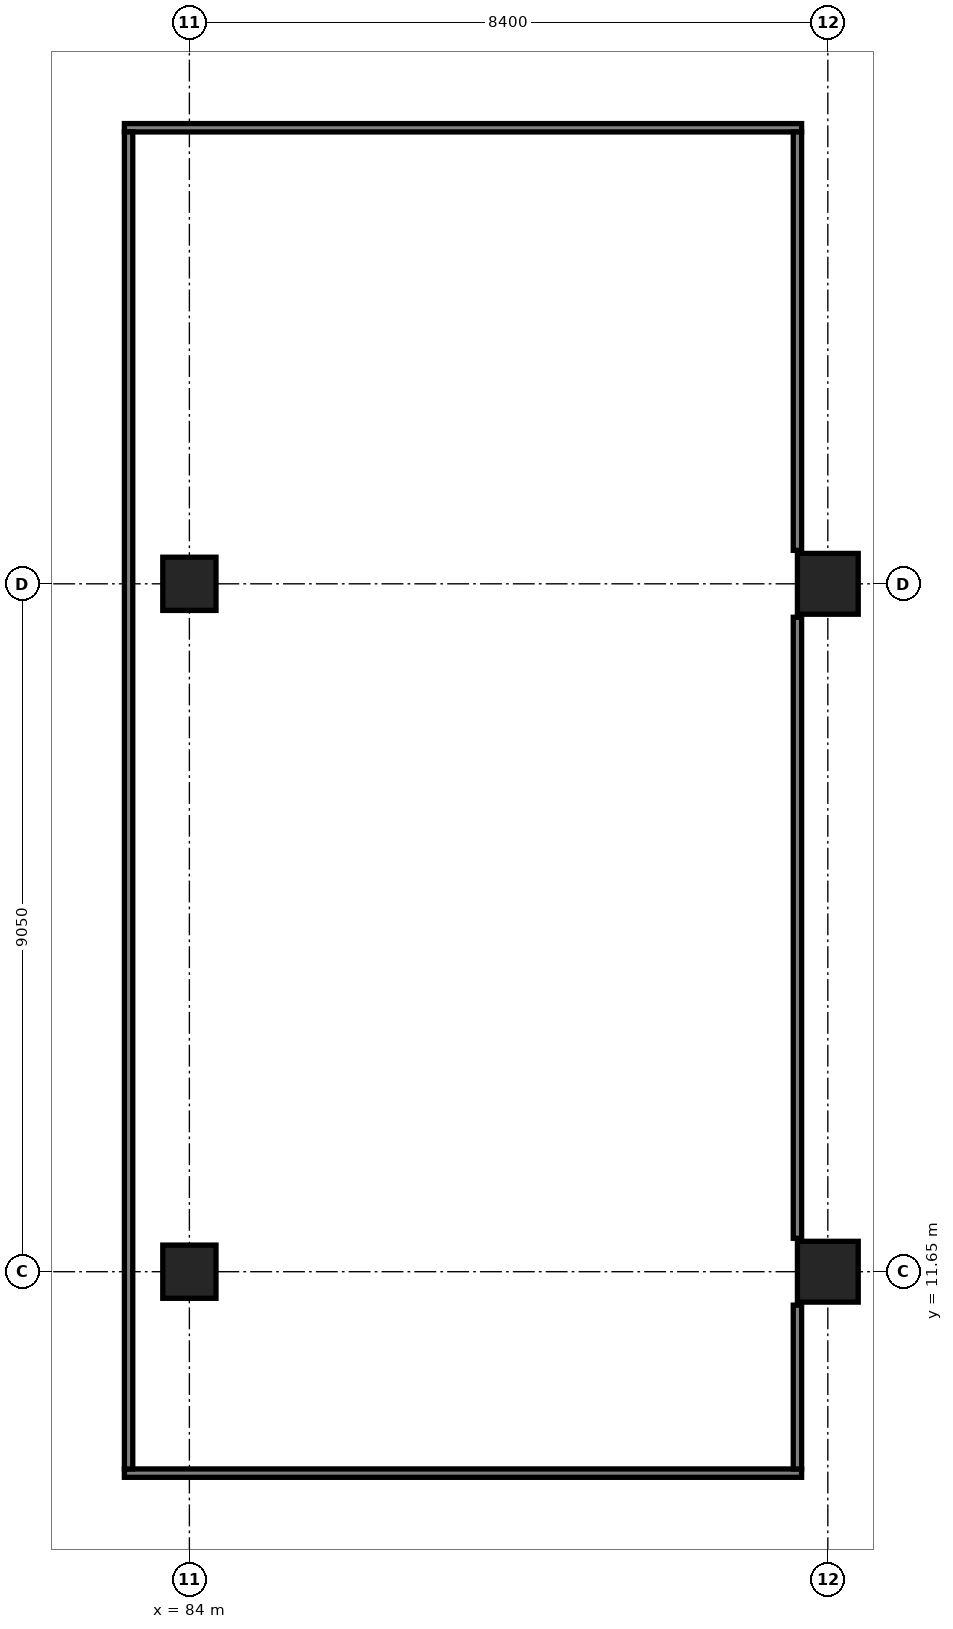
"""IFC4 building model, lengths in metres.
Left out: names, types, materials, properties, quantities, classifications, styles, units other than length and angle.
Written with IfcOpenShell. Run it as: python <this file> out.ifc"""

import sys

from ifc_helpers import new_model, si_unit, direction, frame, frame_2d, origin, origin_2d, place, context, subcontext, project, spatial, rectangle, extrude, element, fill, save


model = new_model("IFC4")
c1 = context("Model", 3, precision=1e-05, world=origin(), true_north=direction((0.0, 1.0)))
c2 = subcontext(c1, "Body", "Model", "MODEL_VIEW")
j1 = project(units=[si_unit("LENGTHUNIT", "METRE"), si_unit("PLANEANGLEUNIT", "RADIAN")], contexts=[c1])
p1 = place(None, origin())
s1 = spatial("IfcSite", under=j1, at=p1, CompositionType="ELEMENT")
p2 = place(p1, origin())
s2 = spatial("IfcBuilding", under=s1, at=p2, CompositionType="ELEMENT")
p3 = place(p2, frame((0.0, 0.0, 10.8)))
s3 = spatial("IfcBuildingStorey", under=s2, at=p3, CompositionType="ELEMENT", Elevation=10.8)
for number, where, z_axis, x_axis in (
    (1, (84.0, 11.65, 0.0), (0.0, 0.0, 1.0), (1.0, 0.0, 0.0)),
    (2, (84.0, 20.7, 0.0), (0.0, 0.0, 1.0), (1.0, 0.0, 0.0)),
):
    element("IfcColumn", number, at=place(p3, frame(where, z_axis=z_axis, x_axis=x_axis)), inside=s3, PredefinedType="COLUMN", context=c2, shape_type="SweptSolid", body=[
        extrude(rectangle(XDim=0.7, YDim=0.7, at=origin_2d()), origin(), (0.0, 0.0, 1.0), 4.8),
    ])
for number, where, z_axis, x_axis in (
    (3, (92.4, 11.65, 0.0), (0.0, 0.0, 1.0), (1.0, 0.0, 0.0)),
    (4, (92.4, 20.7, 0.0), (0.0, 0.0, 1.0), (1.0, 0.0, 0.0)),
):
    element("IfcColumn", number, at=place(p3, frame(where, z_axis=z_axis, x_axis=x_axis)), inside=s3, PredefinedType="COLUMN", context=c2, shape_type="SweptSolid", body=[
        extrude(rectangle(XDim=0.8, YDim=0.8, at=origin_2d()), origin(), (0.0, 0.0, 1.0), 4.8),
    ])
p4 = place(p3, frame((83.145, 9.0, 0.0), z_axis=(0.0, 0.0, 1.0), x_axis=(1.0, 0.0, 0.0)))
e5 = element("IfcWall", 5, at=p4, inside=s3, PredefinedType="PARTITIONING", context=c2, shape_type="SweptSolid", body=[
    extrude(rectangle(XDim=8.91, YDim=0.11, at=frame_2d((4.455, 0.0))), origin(), (0.0, 0.0, 1.0), 3.75),
])
p5 = place(p4, frame((3.495, 0.0, 0.0)))
e6 = element("IfcOpeningElement", 6, at=p5, cuts=e5, PredefinedType="OPENING", context=c2, shape_type="SweptSolid", body=[
    extrude(rectangle(XDim=1.92, YDim=2.4, at=frame_2d((0.96, 1.2))), frame((0.0, 0.065, 0.0), z_axis=(0.0, -1.0, 0.0), x_axis=(1.0, 0.0, 0.0)), (0.0, 0.0, 1.0), 0.13),
])
p6 = place(p3, frame((83.145, 26.7, 0.0), z_axis=(0.0, 0.0, 1.0), x_axis=(1.0, 0.0, 0.0)))
e7 = element("IfcWall", 7, at=p6, inside=s3, PredefinedType="PARTITIONING", context=c2, shape_type="SweptSolid", body=[
    extrude(rectangle(XDim=8.91, YDim=0.11, at=frame_2d((4.455, 0.0))), origin(), (0.0, 0.0, 1.0), 3.75),
])
p7 = place(p3, frame((92.0, 9.055, 0.0), z_axis=(0.0, 0.0, 1.0), x_axis=(0.0, 1.0, 0.0)))
e8 = element("IfcWall", 8, at=p7, inside=s3, PredefinedType="PARTITIONING", context=c2, shape_type="SweptSolid", body=[
    extrude(rectangle(XDim=2.155, YDim=0.11, at=frame_2d((1.078, 0.0))), origin(), (0.0, 0.0, 1.0), 4.5),
])
p8 = place(p3, frame((92.0, 12.09, 0.0), z_axis=(0.0, 0.0, 1.0), x_axis=(0.0, 1.0, 0.0)))
e9 = element("IfcWall", 9, at=p8, inside=s3, PredefinedType="PARTITIONING", context=c2, shape_type="SweptSolid", body=[
    extrude(rectangle(XDim=8.17, YDim=0.11, at=frame_2d((4.085, 0.0))), origin(), (0.0, 0.0, 1.0), 4.14),
])
p9 = place(p3, frame((92.0, 21.14, 0.0), z_axis=(0.0, 0.0, 1.0), x_axis=(0.0, 1.0, 0.0)))
e10 = element("IfcWall", 10, at=p9, inside=s3, PredefinedType="PARTITIONING", context=c2, shape_type="SweptSolid", body=[
    extrude(rectangle(XDim=5.505, YDim=0.11, at=frame_2d((2.752, 0.0))), origin(), (0.0, 0.0, 1.0), 4.14),
])
p10 = place(p3, frame((83.2, 9.055, 0.0), z_axis=(0.0, 0.0, 1.0), x_axis=(0.0, 1.0, 0.0)))
e11 = element("IfcWall", 11, at=p10, inside=s3, PredefinedType="PARTITIONING", context=c2, shape_type="SweptSolid", body=[
    extrude(rectangle(XDim=17.59, YDim=0.11, at=frame_2d((8.795, 0.0))), origin(), (0.0, 0.0, 1.0), 3.73),
])
p11 = place(p5, origin())
e12 = element("IfcDoor", 12, at=p11, inside=s3, OperationType="DOUBLE_DOOR_SINGLE_SWING", PredefinedType="DOOR", context=c2, shape_type="SweptSolid", body=[
    extrude(rectangle(XDim=1.92, YDim=2.4, at=frame_2d((0.96, 1.2))), frame((0.0, 0.025, 0.0), z_axis=(0.0, -1.0, 0.0), x_axis=(1.0, 0.0, 0.0)), (0.0, 0.0, 1.0), 0.05),
])
fill(e6, e12)
save(model, sys.argv[1])
